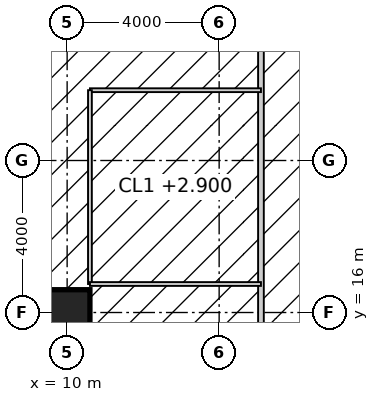
"""IFC4 building model, lengths in metres.
Left out: names, types, materials, properties, quantities, classifications, styles, units other than length and angle.
Written with IfcOpenShell. Run it as: python <this file> out.ifc"""

import sys

from ifc_helpers import new_model, si_unit, direction, frame, frame_2d, origin, origin_2d, place, context, subcontext, project, spatial, rectangle, hollow_rectangle, extrude, element, fill, save


model = new_model("IFC4")
c1 = context("Model", 3, precision=1e-05, world=origin(), true_north=direction((0.0, 1.0)))
c2 = subcontext(c1, "Body", "Model", "MODEL_VIEW")
j1 = project(units=[si_unit("LENGTHUNIT", "METRE"), si_unit("PLANEANGLEUNIT", "RADIAN")], contexts=[c1])
p1 = place(None, origin())
s1 = spatial("IfcSite", under=j1, at=p1, CompositionType="ELEMENT")
p2 = place(p1, origin())
s2 = spatial("IfcBuilding", under=s1, at=p2, CompositionType="ELEMENT")
p3 = place(p2, frame((0.0, 0.0, 27.0)))
s3 = spatial("IfcBuildingStorey", under=s2, at=p3, CompositionType="ELEMENT", Elevation=27.0)
p4 = place(p3, frame((10.0, 16.0, 0.0), z_axis=(0.0, 0.0, 1.0), x_axis=(1.0, 0.0, 0.0)))
e1 = element("IfcColumn", 1, at=p4, inside=s3, PredefinedType="COLUMN", context=c2, shape_type="SweptSolid", body=[
    extrude(hollow_rectangle(XDim=1.2, YDim=1.2, WallThickness=0.1, at=origin_2d()), origin(), (0.0, 0.0, 1.0), 4.0),
])
p5 = place(p3, frame((15.1, 15.225, 0.0), z_axis=(0.0, 0.0, 1.0), x_axis=(0.0, 1.0, 0.0)))
e2 = element("IfcWall", 2, at=p5, inside=s3, PredefinedType="PARTITIONING", context=c2, shape_type="SweptSolid", body=[
    extrude(rectangle(XDim=23.55, YDim=0.15, at=frame_2d((11.775, 0.0))), origin(), (0.0, 0.0, 1.0), 3.85),
])
p6 = place(p5, frame((3.175, 0.0, 0.0)))
e3 = element("IfcOpeningElement", 3, at=p6, cuts=e2, PredefinedType="OPENING", context=c2, shape_type="SweptSolid", body=[
    extrude(rectangle(XDim=1.8, YDim=2.4, at=frame_2d((0.9, 1.2))), frame((0.0, 0.085, 0.0), z_axis=(0.0, -1.0, 0.0), x_axis=(1.0, 0.0, 0.0)), (0.0, 0.0, 1.0), 0.17),
])
p7 = place(p5, frame((14.825, 0.0, 0.0)))
e4 = element("IfcOpeningElement", 4, at=p7, cuts=e2, PredefinedType="OPENING", context=c2, shape_type="SweptSolid", body=[
    extrude(rectangle(XDim=1.8, YDim=2.4, at=frame_2d((0.9, 1.2))), frame((0.0, 0.085, 0.0), z_axis=(0.0, -1.0, 0.0), x_axis=(1.0, 0.0, 0.0)), (0.0, 0.0, 1.0), 0.17),
])
p8 = place(p3, frame((15.1, 21.85, 0.0), z_axis=(0.0, 0.0, 1.0), x_axis=(-1.0, 0.0, 0.0)))
e5 = element("IfcWall", 5, at=p8, inside=s3, PredefinedType="PARTITIONING", context=c2, shape_type="SweptSolid", body=[
    extrude(rectangle(XDim=4.5, YDim=0.1, at=frame_2d((2.25, 0.0))), origin(), (0.0, 0.0, 1.0), 3.85),
])
p9 = place(p3, frame((10.6, 21.85, 0.0), z_axis=(0.0, 0.0, 1.0), x_axis=(0.0, -1.0, 0.0)))
e6 = element("IfcWall", 6, at=p9, inside=s3, PredefinedType="PARTITIONING", context=c2, shape_type="SweptSolid", body=[
    extrude(rectangle(XDim=5.1, YDim=0.1, at=frame_2d((2.55, 0.0))), origin(), (0.0, 0.0, 1.0), 3.85),
])
p10 = place(p9, frame((2.05, 0.0, 0.0)))
e7 = element("IfcOpeningElement", 7, at=p10, cuts=e6, PredefinedType="OPENING", context=c2, shape_type="SweptSolid", body=[
    extrude(rectangle(XDim=1.0, YDim=2.2, at=frame_2d((0.5, 1.1))), frame((0.0, 0.06, 0.0), z_axis=(0.0, -1.0, 0.0), x_axis=(1.0, 0.0, 0.0)), (0.0, 0.0, 1.0), 0.12),
])
p11 = place(p3, frame((10.6, 16.75, 0.0), z_axis=(0.0, 0.0, 1.0), x_axis=(1.0, 0.0, 0.0)))
e8 = element("IfcWall", 8, at=p11, inside=s3, PredefinedType="PARTITIONING", context=c2, shape_type="SweptSolid", body=[
    extrude(rectangle(XDim=4.5, YDim=0.1, at=frame_2d((2.25, 0.0))), origin(), (0.0, 0.0, 1.0), 3.85),
])
p12 = place(p6, origin())
e9 = element("IfcDoor", 9, at=p12, inside=s3, OperationType="DOUBLE_DOOR_DOUBLE_SWING", PredefinedType="DOOR", context=c2, shape_type="SweptSolid", body=[
    extrude(rectangle(XDim=1.8, YDim=2.4, at=frame_2d((0.9, 1.2))), frame((0.0, 0.025, 0.0), z_axis=(0.0, -1.0, 0.0), x_axis=(1.0, 0.0, 0.0)), (0.0, 0.0, 1.0), 0.05),
])
fill(e3, e9)
p13 = place(p10, origin())
e10 = element("IfcDoor", 10, at=p13, inside=s3, OperationType="SINGLE_SWING_RIGHT", PredefinedType="DOOR", context=c2, shape_type="SweptSolid", body=[
    extrude(rectangle(XDim=1.0, YDim=2.2, at=frame_2d((0.5, 1.1))), frame((0.0, 0.025, 0.0), z_axis=(0.0, -1.0, 0.0), x_axis=(1.0, 0.0, 0.0)), (0.0, 0.0, 1.0), 0.05),
])
fill(e7, e10)
save(model, sys.argv[1])
